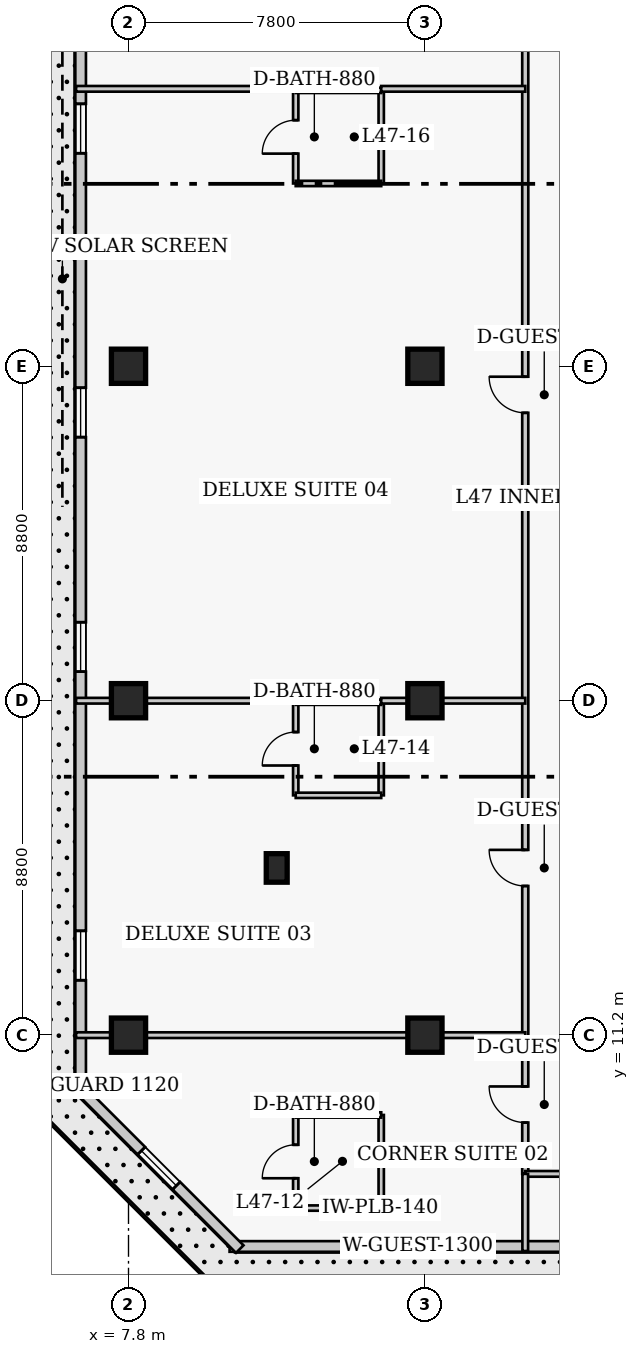
"""IFC4 building model, lengths in metres.
Left out: names, types, materials, properties, quantities, classifications, styles, units other than length and angle.
Written with IfcOpenShell. Run it as: python <this file> out.ifc"""

import sys

from ifc_helpers import new_model, si_unit, direction, frame, frame_2d, origin, origin_2d, place, context, subcontext, project, spatial, rectangle, extrude, element, fill, save


model = new_model("IFC4")
c1 = context("Model", 3, precision=1e-05, world=origin(), true_north=direction((0.0, 1.0)))
c2 = subcontext(c1, "Body", "Model", "MODEL_VIEW")
j1 = project(units=[si_unit("LENGTHUNIT", "METRE"), si_unit("PLANEANGLEUNIT", "RADIAN")], contexts=[c1])
p1 = place(None, origin())
s1 = spatial("IfcSite", under=j1, at=p1, CompositionType="ELEMENT")
p2 = place(p1, origin())
s2 = spatial("IfcBuilding", under=s1, at=p2, CompositionType="ELEMENT")
p3 = place(p2, frame((0.0, 0.0, 189.0)))
s3 = spatial("IfcBuildingStorey", under=s2, at=p3, CompositionType="ELEMENT", Elevation=189.0)
for number, where, z_axis, x_axis in (
    (1, (7.8, 11.2, 0.0), (0.0, 0.0, 1.0), (1.0, 0.0, 0.0)),
    (2, (7.8, 20.0, 0.0), (0.0, 0.0, 1.0), (1.0, 0.0, 0.0)),
    (3, (7.8, 28.8, 0.0), (0.0, 0.0, 1.0), (1.0, 0.0, 0.0)),
    (4, (15.6, 11.2, 0.0), (0.0, 0.0, 1.0), (1.0, 0.0, 0.0)),
    (5, (15.6, 20.0, 0.0), (0.0, 0.0, 1.0), (1.0, 0.0, 0.0)),
    (6, (15.6, 28.8, 0.0), (0.0, 0.0, 1.0), (1.0, 0.0, 0.0)),
):
    element("IfcColumn", number, at=place(p3, frame(where, z_axis=z_axis, x_axis=x_axis)), inside=s3, PredefinedType="COLUMN", context=c2, shape_type="SweptSolid", body=[
        extrude(rectangle(XDim=0.9, YDim=0.9, at=origin_2d()), origin(), (0.0, 0.0, 1.0), 3.9),
    ])
p4 = place(p3, frame((11.7, 15.6, 0.0), z_axis=(0.0, 0.0, 1.0), x_axis=(1.0, 0.0, 0.0)))
e7 = element("IfcColumn", 7, at=p4, inside=s3, PredefinedType="PILASTER", context=c2, shape_type="SweptSolid", body=[
    extrude(rectangle(XDim=0.55, YDim=0.75, at=origin_2d()), origin(), (0.0, 0.0, 1.0), 3.9),
])
p5 = place(p3, frame((10.46, 5.64, 0.0), z_axis=(0.0, 0.0, 1.0), x_axis=(1.0, 0.0, 0.0)))
e8 = element("IfcWall", 8, at=p5, inside=s3, PredefinedType="SOLIDWALL", context=c2, shape_type="SweptSolid", body=[
    extrude(rectangle(XDim=25.83, YDim=0.28, at=frame_2d((12.915, 0.0))), origin(), (0.0, 0.0, 1.0), 3.65),
])
p6 = place(p5, frame((9.965, 0.0, 0.0)))
e9 = element("IfcOpeningElement", 9, at=p6, cuts=e8, PredefinedType="OPENING", context=c2, shape_type="SweptSolid", body=[
    extrude(rectangle(XDim=1.4, YDim=2.15, at=frame_2d((0.7, 1.075))), frame((0.0, 0.15, 0.0), z_axis=(0.0, -1.0, 0.0), x_axis=(1.0, 0.0, 0.0)), (0.0, 0.0, 1.0), 0.3),
])
p7 = place(p5, frame((4.305, 0.0, 0.85)))
e10 = element("IfcOpeningElement", 10, at=p7, cuts=e8, PredefinedType="OPENING", context=c2, shape_type="SweptSolid", body=[
    extrude(rectangle(XDim=1.3, YDim=1.7, at=frame_2d((0.65, 0.85))), frame((0.0, 0.15, 0.0), z_axis=(0.0, -1.0, 0.0), x_axis=(1.0, 0.0, 0.0)), (0.0, 0.0, 1.0), 0.3),
])
p8 = place(p5, frame((12.915, 0.0, 0.85)))
e11 = element("IfcOpeningElement", 11, at=p8, cuts=e8, PredefinedType="OPENING", context=c2, shape_type="SweptSolid", body=[
    extrude(rectangle(XDim=1.3, YDim=1.7, at=frame_2d((0.65, 0.85))), frame((0.0, 0.15, 0.0), z_axis=(0.0, -1.0, 0.0), x_axis=(1.0, 0.0, 0.0)), (0.0, 0.0, 1.0), 0.3),
])
p9 = place(p5, frame((20.875, 0.0, 0.85)))
e12 = element("IfcOpeningElement", 12, at=p9, cuts=e8, PredefinedType="OPENING", context=c2, shape_type="SweptSolid", body=[
    extrude(rectangle(XDim=1.3, YDim=1.7, at=frame_2d((0.65, 0.85))), frame((0.0, 0.15, 0.0), z_axis=(0.0, -1.0, 0.0), x_axis=(1.0, 0.0, 0.0)), (0.0, 0.0, 1.0), 0.3),
])
p10 = place(p3, frame((6.54, 39.44, 0.0), z_axis=(0.0, 0.0, 1.0), x_axis=(0.0, -1.0, 0.0)))
e13 = element("IfcWall", 13, at=p10, inside=s3, PredefinedType="SOLIDWALL", context=c2, shape_type="SweptSolid", body=[
    extrude(rectangle(XDim=29.88, YDim=0.28, at=frame_2d((14.94, 0.0))), origin(), (0.0, 0.0, 1.0), 3.65),
])
p11 = place(p10, frame((3.735, 0.0, 0.85)))
e14 = element("IfcOpeningElement", 14, at=p11, cuts=e13, PredefinedType="OPENING", context=c2, shape_type="SweptSolid", body=[
    extrude(rectangle(XDim=1.3, YDim=1.7, at=frame_2d((0.65, 0.85))), frame((0.0, 0.15, 0.0), z_axis=(0.0, -1.0, 0.0), x_axis=(1.0, 0.0, 0.0)), (0.0, 0.0, 1.0), 0.3),
])
p12 = place(p10, frame((11.205, 0.0, 0.85)))
e15 = element("IfcOpeningElement", 15, at=p12, cuts=e13, PredefinedType="OPENING", context=c2, shape_type="SweptSolid", body=[
    extrude(rectangle(XDim=1.3, YDim=1.7, at=frame_2d((0.65, 0.85))), frame((0.0, 0.15, 0.0), z_axis=(0.0, -1.0, 0.0), x_axis=(1.0, 0.0, 0.0)), (0.0, 0.0, 1.0), 0.3),
])
p13 = place(p10, frame((17.375, 0.0, 0.85)))
e16 = element("IfcOpeningElement", 16, at=p13, cuts=e13, PredefinedType="OPENING", context=c2, shape_type="SweptSolid", body=[
    extrude(rectangle(XDim=1.3, YDim=1.7, at=frame_2d((0.65, 0.85))), frame((0.0, 0.15, 0.0), z_axis=(0.0, -1.0, 0.0), x_axis=(1.0, 0.0, 0.0)), (0.0, 0.0, 1.0), 0.3),
])
p14 = place(p10, frame((25.495, 0.0, 0.85)))
e17 = element("IfcOpeningElement", 17, at=p14, cuts=e13, PredefinedType="OPENING", context=c2, shape_type="SweptSolid", body=[
    extrude(rectangle(XDim=1.3, YDim=1.7, at=frame_2d((0.65, 0.85))), frame((0.0, 0.15, 0.0), z_axis=(0.0, -1.0, 0.0), x_axis=(1.0, 0.0, 0.0)), (0.0, 0.0, 1.0), 0.3),
])
p15 = place(p3, frame((6.471, 9.827, 0.0), z_axis=(0.0, 0.0, 1.0), x_axis=(0.707106781187, -0.707106781187, 0.0)))
e18 = element("IfcWall", 18, at=p15, inside=s3, PredefinedType="SOLIDWALL", context=c2, shape_type="SweptSolid", body=[
    extrude(rectangle(XDim=6.02, YDim=0.28, at=frame_2d((3.01, 0.0))), origin(), (0.0, 0.0, 1.0), 3.65),
])
p16 = place(p15, frame((2.36, 0.0, 0.85)))
e19 = element("IfcOpeningElement", 19, at=p16, cuts=e18, PredefinedType="OPENING", context=c2, shape_type="SweptSolid", body=[
    extrude(rectangle(XDim=1.3, YDim=1.7, at=frame_2d((0.65, 0.85))), frame((0.0, 0.15, 0.0), z_axis=(0.0, -1.0, 0.0), x_axis=(1.0, 0.0, 0.0)), (0.0, 0.0, 1.0), 0.3),
])
p17 = place(p3, frame((18.24, 7.55, 0.0), z_axis=(0.0, 0.0, 1.0), x_axis=(0.0, 1.0, 0.0)))
e20 = element("IfcWall", 20, at=p17, inside=s3, PredefinedType="PARTITIONING", context=c2, shape_type="SweptSolid", body=[
    extrude(rectangle(XDim=33.1, YDim=0.16, at=frame_2d((16.55, 0.0))), origin(), (0.0, 0.0, 1.0), 3.65),
])
p18 = place(p17, frame((1.35, 0.0, 0.0)))
e21 = element("IfcOpeningElement", 21, at=p18, cuts=e20, PredefinedType="OPENING", context=c2, shape_type="SweptSolid", body=[
    extrude(rectangle(XDim=0.95, YDim=2.1, at=frame_2d((0.475, 1.05))), frame((0.0, 0.09, 0.0), z_axis=(0.0, -1.0, 0.0), x_axis=(1.0, 0.0, 0.0)), (0.0, 0.0, 1.0), 0.18),
])
p19 = place(p17, frame((7.575, 0.0, 0.0)))
e22 = element("IfcOpeningElement", 22, at=p19, cuts=e20, PredefinedType="OPENING", context=c2, shape_type="SweptSolid", body=[
    extrude(rectangle(XDim=0.95, YDim=2.1, at=frame_2d((0.475, 1.05))), frame((0.0, 0.09, 0.0), z_axis=(0.0, -1.0, 0.0), x_axis=(1.0, 0.0, 0.0)), (0.0, 0.0, 1.0), 0.18),
])
p20 = place(p17, frame((20.025, 0.0, 0.0)))
e23 = element("IfcOpeningElement", 23, at=p20, cuts=e20, PredefinedType="OPENING", context=c2, shape_type="SweptSolid", body=[
    extrude(rectangle(XDim=0.95, YDim=2.1, at=frame_2d((0.475, 1.05))), frame((0.0, 0.09, 0.0), z_axis=(0.0, -1.0, 0.0), x_axis=(1.0, 0.0, 0.0)), (0.0, 0.0, 1.0), 0.18),
])
p21 = place(p17, frame((30.38, 0.0, 0.0)))
e24 = element("IfcOpeningElement", 24, at=p21, cuts=e20, PredefinedType="OPENING", context=c2, shape_type="SweptSolid", body=[
    extrude(rectangle(XDim=1.0, YDim=2.15, at=frame_2d((0.5, 1.075))), frame((0.0, 0.09, 0.0), z_axis=(0.0, -1.0, 0.0), x_axis=(1.0, 0.0, 0.0)), (0.0, 0.0, 1.0), 0.18),
])
p22 = place(p3, frame((18.24, 7.55, 0.0), z_axis=(0.0, 0.0, 1.0), x_axis=(1.0, 0.0, 0.0)))
e25 = element("IfcWall", 25, at=p22, inside=s3, PredefinedType="PARTITIONING", context=c2, shape_type="SweptSolid", body=[
    extrude(rectangle(XDim=2.22, YDim=0.15, at=frame_2d((1.11, 0.0))), origin(), (0.0, 0.0, 1.0), 3.65),
])
p23 = place(p3, frame((18.24, 5.52, 0.0), z_axis=(0.0, 0.0, 1.0), x_axis=(0.0, 1.0, 0.0)))
e26 = element("IfcWall", 26, at=p23, inside=s3, PredefinedType="PARTITIONING", context=c2, shape_type="SweptSolid", body=[
    extrude(rectangle(XDim=2.03, YDim=0.15, at=frame_2d((1.015, 0.0))), origin(), (0.0, 0.0, 1.0), 3.65),
])
p24 = place(p3, frame((12.2, 6.65, 0.0), z_axis=(0.0, 0.0, 1.0), x_axis=(0.0, 1.0, 0.0)))
e27 = element("IfcWall", 27, at=p24, inside=s3, PredefinedType="PLUMBINGWALL", context=c2, shape_type="SweptSolid", body=[
    extrude(rectangle(XDim=2.45, YDim=0.14, at=frame_2d((1.225, 0.0))), origin(), (0.0, 0.0, 1.0), 3.65),
])
p25 = place(p24, frame((0.785, 0.0, 0.0)))
e28 = element("IfcOpeningElement", 28, at=p25, cuts=e27, PredefinedType="OPENING", context=c2, shape_type="SweptSolid", body=[
    extrude(rectangle(XDim=0.88, YDim=2.05, at=frame_2d((0.44, 1.025))), frame((0.0, 0.08, 0.0), z_axis=(0.0, -1.0, 0.0), x_axis=(1.0, 0.0, 0.0)), (0.0, 0.0, 1.0), 0.16),
])
p26 = place(p3, frame((14.45, 6.65, 0.0), z_axis=(0.0, 0.0, 1.0), x_axis=(0.0, 1.0, 0.0)))
e29 = element("IfcWall", 29, at=p26, inside=s3, PredefinedType="PLUMBINGWALL", context=c2, shape_type="SweptSolid", body=[
    extrude(rectangle(XDim=2.45, YDim=0.14, at=frame_2d((1.225, 0.0))), origin(), (0.0, 0.0, 1.0), 3.65),
])
for number, where, z_axis, x_axis in (
    (30, (12.2, 6.65, 0.0), (0.0, 0.0, 1.0), (1.0, 0.0, 0.0)),
    (31, (12.2, 9.1, 0.0), (0.0, 0.0, 1.0), (1.0, 0.0, 0.0)),
):
    element("IfcWall", number, at=place(p3, frame(where, z_axis=z_axis, x_axis=x_axis)), inside=s3, PredefinedType="PLUMBINGWALL", context=c2, shape_type="SweptSolid", body=[
        extrude(rectangle(XDim=2.25, YDim=0.14, at=frame_2d((1.125, 0.0))), origin(), (0.0, 0.0, 1.0), 3.65),
    ])
p27 = place(p3, frame((6.42, 11.2, 0.0), z_axis=(0.0, 0.0, 1.0), x_axis=(1.0, 0.0, 0.0)))
e32 = element("IfcWall", 32, at=p27, inside=s3, PredefinedType="PARTITIONING", context=c2, shape_type="SweptSolid", body=[
    extrude(rectangle(XDim=11.82, YDim=0.15, at=frame_2d((5.91, 0.0))), origin(), (0.0, 0.0, 1.0), 2.878),
])
p28 = place(p3, frame((12.2, 17.51, 0.0), z_axis=(0.0, 0.0, 1.0), x_axis=(0.0, 1.0, 0.0)))
e33 = element("IfcWall", 33, at=p28, inside=s3, PredefinedType="PLUMBINGWALL", context=c2, shape_type="SweptSolid", body=[
    extrude(rectangle(XDim=2.45, YDim=0.14, at=frame_2d((1.225, 0.0))), origin(), (0.0, 0.0, 1.0), 3.65),
])
p29 = place(p28, frame((0.785, 0.0, 0.0)))
e34 = element("IfcOpeningElement", 34, at=p29, cuts=e33, PredefinedType="OPENING", context=c2, shape_type="SweptSolid", body=[
    extrude(rectangle(XDim=0.88, YDim=2.05, at=frame_2d((0.44, 1.025))), frame((0.0, 0.08, 0.0), z_axis=(0.0, -1.0, 0.0), x_axis=(1.0, 0.0, 0.0)), (0.0, 0.0, 1.0), 0.16),
])
p30 = place(p3, frame((14.45, 17.51, 0.0), z_axis=(0.0, 0.0, 1.0), x_axis=(0.0, 1.0, 0.0)))
e35 = element("IfcWall", 35, at=p30, inside=s3, PredefinedType="PLUMBINGWALL", context=c2, shape_type="SweptSolid", body=[
    extrude(rectangle(XDim=2.45, YDim=0.14, at=frame_2d((1.225, 0.0))), origin(), (0.0, 0.0, 1.0), 3.65),
])
p31 = place(p3, frame((12.2, 17.51, 0.0), z_axis=(0.0, 0.0, 1.0), x_axis=(1.0, 0.0, 0.0)))
e36 = element("IfcWall", 36, at=p31, inside=s3, PredefinedType="PLUMBINGWALL", context=c2, shape_type="SweptSolid", body=[
    extrude(rectangle(XDim=2.25, YDim=0.14, at=frame_2d((1.125, 0.0))), origin(), (0.0, 0.0, 1.0), 3.65),
])
p32 = place(p3, frame((12.2, 19.96, 0.0), z_axis=(0.0, 0.0, 1.0), x_axis=(1.0, 0.0, 0.0)))
e37 = element("IfcWall", 37, at=p32, inside=s3, PredefinedType="PLUMBINGWALL", context=c2, shape_type="SweptSolid", body=[
    extrude(rectangle(XDim=2.25, YDim=0.14, at=frame_2d((1.125, 0.0))), origin(), (0.0, 0.0, 1.0), 3.038),
])
p33 = place(p3, frame((6.42, 20.0, 0.0), z_axis=(0.0, 0.0, 1.0), x_axis=(1.0, 0.0, 0.0)))
e38 = element("IfcWall", 38, at=p33, inside=s3, PredefinedType="PARTITIONING", context=c2, shape_type="SweptSolid", body=[
    extrude(rectangle(XDim=5.78, YDim=0.15, at=frame_2d((2.89, 0.0))), origin(), (0.0, 0.0, 1.0), 2.878),
])
p34 = place(p3, frame((14.45, 20.0, 0.0), z_axis=(0.0, 0.0, 1.0), x_axis=(1.0, 0.0, 0.0)))
e39 = element("IfcWall", 39, at=p34, inside=s3, PredefinedType="PARTITIONING", context=c2, shape_type="SweptSolid", body=[
    extrude(rectangle(XDim=3.79, YDim=0.15, at=frame_2d((1.895, 0.0))), origin(), (0.0, 0.0, 1.0), 2.878),
])
p35 = place(p3, frame((12.2, 33.61, 0.0), z_axis=(0.0, 0.0, 1.0), x_axis=(0.0, 1.0, 0.0)))
e40 = element("IfcWall", 40, at=p35, inside=s3, PredefinedType="PLUMBINGWALL", context=c2, shape_type="SweptSolid", body=[
    extrude(rectangle(XDim=2.45, YDim=0.14, at=frame_2d((1.225, 0.0))), origin(), (0.0, 0.0, 1.0), 3.65),
])
p36 = place(p35, frame((0.785, 0.0, 0.0)))
e41 = element("IfcOpeningElement", 41, at=p36, cuts=e40, PredefinedType="OPENING", context=c2, shape_type="SweptSolid", body=[
    extrude(rectangle(XDim=0.88, YDim=2.05, at=frame_2d((0.44, 1.025))), frame((0.0, 0.08, 0.0), z_axis=(0.0, -1.0, 0.0), x_axis=(1.0, 0.0, 0.0)), (0.0, 0.0, 1.0), 0.16),
])
p37 = place(p3, frame((14.45, 33.61, 0.0), z_axis=(0.0, 0.0, 1.0), x_axis=(0.0, 1.0, 0.0)))
e42 = element("IfcWall", 42, at=p37, inside=s3, PredefinedType="PLUMBINGWALL", context=c2, shape_type="SweptSolid", body=[
    extrude(rectangle(XDim=2.45, YDim=0.14, at=frame_2d((1.225, 0.0))), origin(), (0.0, 0.0, 1.0), 3.65),
])
for number, where, z_axis, x_axis in (
    (43, (12.2, 33.61, 0.0), (0.0, 0.0, 1.0), (1.0, 0.0, 0.0)),
    (44, (12.2, 36.06, 0.0), (0.0, 0.0, 1.0), (1.0, 0.0, 0.0)),
):
    element("IfcWall", number, at=place(p3, frame(where, z_axis=z_axis, x_axis=x_axis)), inside=s3, PredefinedType="PLUMBINGWALL", context=c2, shape_type="SweptSolid", body=[
        extrude(rectangle(XDim=2.25, YDim=0.14, at=frame_2d((1.125, 0.0))), origin(), (0.0, 0.0, 1.0), 3.65),
    ])
p38 = place(p3, frame((6.42, 36.1, 0.0), z_axis=(0.0, 0.0, 1.0), x_axis=(1.0, 0.0, 0.0)))
e45 = element("IfcWall", 45, at=p38, inside=s3, PredefinedType="PARTITIONING", context=c2, shape_type="SweptSolid", body=[
    extrude(rectangle(XDim=5.78, YDim=0.15, at=frame_2d((2.89, 0.0))), origin(), (0.0, 0.0, 1.0), 3.65),
])
p39 = place(p3, frame((14.45, 36.1, 0.0), z_axis=(0.0, 0.0, 1.0), x_axis=(1.0, 0.0, 0.0)))
e46 = element("IfcWall", 46, at=p39, inside=s3, PredefinedType="PARTITIONING", context=c2, shape_type="SweptSolid", body=[
    extrude(rectangle(XDim=3.79, YDim=0.15, at=frame_2d((1.895, 0.0))), origin(), (0.0, 0.0, 1.0), 3.65),
])
p40 = place(p7, origin())
e47 = element("IfcWindow", 47, at=p40, inside=s3, PartitioningType="SINGLE_PANEL", PredefinedType="WINDOW", context=c2, shape_type="SweptSolid", body=[
    extrude(rectangle(XDim=1.3, YDim=1.7, at=frame_2d((0.65, 0.85))), frame((0.0, 0.03, 0.0), z_axis=(0.0, -1.0, 0.0), x_axis=(1.0, 0.0, 0.0)), (0.0, 0.0, 1.0), 0.06),
])
fill(e10, e47)
p41 = place(p11, origin())
e48 = element("IfcWindow", 48, at=p41, inside=s3, PartitioningType="SINGLE_PANEL", PredefinedType="WINDOW", context=c2, shape_type="SweptSolid", body=[
    extrude(rectangle(XDim=1.3, YDim=1.7, at=frame_2d((0.65, 0.85))), frame((0.0, 0.03, 0.0), z_axis=(0.0, -1.0, 0.0), x_axis=(1.0, 0.0, 0.0)), (0.0, 0.0, 1.0), 0.06),
])
fill(e14, e48)
p42 = place(p12, origin())
e49 = element("IfcWindow", 49, at=p42, inside=s3, PartitioningType="SINGLE_PANEL", PredefinedType="WINDOW", context=c2, shape_type="SweptSolid", body=[
    extrude(rectangle(XDim=1.3, YDim=1.7, at=frame_2d((0.65, 0.85))), frame((0.0, 0.03, 0.0), z_axis=(0.0, -1.0, 0.0), x_axis=(1.0, 0.0, 0.0)), (0.0, 0.0, 1.0), 0.06),
])
fill(e15, e49)
p43 = place(p13, origin())
e50 = element("IfcWindow", 50, at=p43, inside=s3, PartitioningType="SINGLE_PANEL", PredefinedType="WINDOW", context=c2, shape_type="SweptSolid", body=[
    extrude(rectangle(XDim=1.3, YDim=1.7, at=frame_2d((0.65, 0.85))), frame((0.0, 0.03, 0.0), z_axis=(0.0, -1.0, 0.0), x_axis=(1.0, 0.0, 0.0)), (0.0, 0.0, 1.0), 0.06),
])
fill(e16, e50)
p44 = place(p14, origin())
e51 = element("IfcWindow", 51, at=p44, inside=s3, PartitioningType="SINGLE_PANEL", PredefinedType="WINDOW", context=c2, shape_type="SweptSolid", body=[
    extrude(rectangle(XDim=1.3, YDim=1.7, at=frame_2d((0.65, 0.85))), frame((0.0, 0.03, 0.0), z_axis=(0.0, -1.0, 0.0), x_axis=(1.0, 0.0, 0.0)), (0.0, 0.0, 1.0), 0.06),
])
fill(e17, e51)
p45 = place(p16, origin())
e52 = element("IfcWindow", 52, at=p45, inside=s3, PartitioningType="SINGLE_PANEL", PredefinedType="WINDOW", context=c2, shape_type="SweptSolid", body=[
    extrude(rectangle(XDim=1.3, YDim=1.7, at=frame_2d((0.65, 0.85))), frame((0.0, 0.03, 0.0), z_axis=(0.0, -1.0, 0.0), x_axis=(1.0, 0.0, 0.0)), (0.0, 0.0, 1.0), 0.06),
])
fill(e19, e52)
p46 = place(p25, origin())
e53 = element("IfcDoor", 53, at=p46, inside=s3, OperationType="SINGLE_SWING_LEFT", PredefinedType="DOOR", context=c2, shape_type="SweptSolid", body=[
    extrude(rectangle(XDim=0.88, YDim=2.05, at=frame_2d((0.44, 1.025))), frame((0.0, 0.025, 0.0), z_axis=(0.0, -1.0, 0.0), x_axis=(1.0, 0.0, 0.0)), (0.0, 0.0, 1.0), 0.05),
])
fill(e28, e53)
p47 = place(p18, origin())
e54 = element("IfcDoor", 54, at=p47, inside=s3, OperationType="SINGLE_SWING_RIGHT", PredefinedType="DOOR", context=c2, shape_type="SweptSolid", body=[
    extrude(rectangle(XDim=0.95, YDim=2.1, at=frame_2d((0.475, 1.05))), frame((0.0, 0.025, 0.0), z_axis=(0.0, -1.0, 0.0), x_axis=(1.0, 0.0, 0.0)), (0.0, 0.0, 1.0), 0.05),
])
fill(e21, e54)
p48 = place(p29, origin())
e55 = element("IfcDoor", 55, at=p48, inside=s3, OperationType="SINGLE_SWING_LEFT", PredefinedType="DOOR", context=c2, shape_type="SweptSolid", body=[
    extrude(rectangle(XDim=0.88, YDim=2.05, at=frame_2d((0.44, 1.025))), frame((0.0, 0.025, 0.0), z_axis=(0.0, -1.0, 0.0), x_axis=(1.0, 0.0, 0.0)), (0.0, 0.0, 1.0), 0.05),
])
fill(e34, e55)
p49 = place(p19, origin())
e56 = element("IfcDoor", 56, at=p49, inside=s3, OperationType="SINGLE_SWING_RIGHT", PredefinedType="DOOR", context=c2, shape_type="SweptSolid", body=[
    extrude(rectangle(XDim=0.95, YDim=2.1, at=frame_2d((0.475, 1.05))), frame((0.0, 0.025, 0.0), z_axis=(0.0, -1.0, 0.0), x_axis=(1.0, 0.0, 0.0)), (0.0, 0.0, 1.0), 0.05),
])
fill(e22, e56)
p50 = place(p36, origin())
e57 = element("IfcDoor", 57, at=p50, inside=s3, OperationType="SINGLE_SWING_LEFT", PredefinedType="DOOR", context=c2, shape_type="SweptSolid", body=[
    extrude(rectangle(XDim=0.88, YDim=2.05, at=frame_2d((0.44, 1.025))), frame((0.0, 0.025, 0.0), z_axis=(0.0, -1.0, 0.0), x_axis=(1.0, 0.0, 0.0)), (0.0, 0.0, 1.0), 0.05),
])
fill(e41, e57)
p51 = place(p20, origin())
e58 = element("IfcDoor", 58, at=p51, inside=s3, OperationType="SINGLE_SWING_RIGHT", PredefinedType="DOOR", context=c2, shape_type="SweptSolid", body=[
    extrude(rectangle(XDim=0.95, YDim=2.1, at=frame_2d((0.475, 1.05))), frame((0.0, 0.025, 0.0), z_axis=(0.0, -1.0, 0.0), x_axis=(1.0, 0.0, 0.0)), (0.0, 0.0, 1.0), 0.05),
])
fill(e23, e58)
save(model, sys.argv[1])
